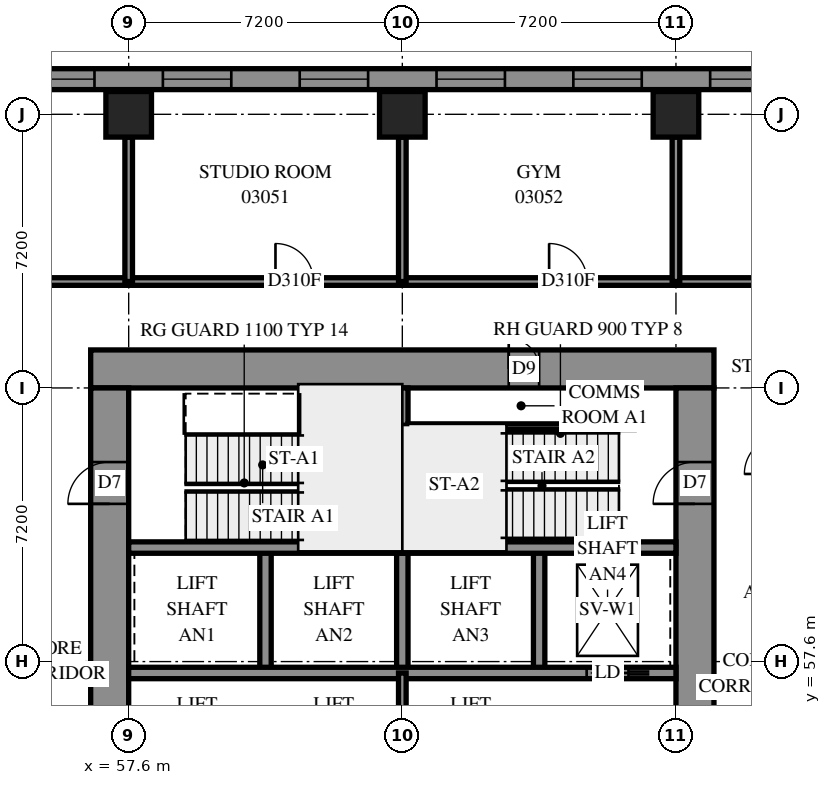
"""IFC4 building model, lengths in metres.
Left out: names, types, materials, properties, quantities, classifications, styles, units other than length and angle.
Written with IfcOpenShell. Run it as: python <this file> out.ifc"""

import sys

from ifc_helpers import new_model, si_unit, direction, frame, frame_2d, origin, origin_2d, place, context, subcontext, project, spatial, polyline, rectangle, outline, extrude, element, fill, save


model = new_model("IFC4")
c1 = context("Model", 3, precision=1e-05, world=origin(), true_north=direction((0.0, 1.0)))
c2 = subcontext(c1, "Body", "Model", "MODEL_VIEW")
j1 = project(units=[si_unit("LENGTHUNIT", "METRE"), si_unit("PLANEANGLEUNIT", "RADIAN")], contexts=[c1])
p1 = place(None, origin())
s1 = spatial("IfcSite", under=j1, at=p1, CompositionType="ELEMENT")
p2 = place(p1, origin())
s2 = spatial("IfcBuilding", under=s1, at=p2, CompositionType="ELEMENT")
p3 = place(p2, frame((0.0, 0.0, 14.4)))
s3 = spatial("IfcBuildingStorey", under=s2, at=p3, CompositionType="ELEMENT", Elevation=14.4)
for number, where, z_axis, x_axis in (
    (1, (57.6, 72.0, 0.0), (0.0, 0.0, 1.0), (1.0, 0.0, 0.0)),
    (2, (64.8, 72.0, 0.0), (0.0, 0.0, 1.0), (1.0, 0.0, 0.0)),
    (3, (72.0, 72.0, 0.0), (0.0, 0.0, 1.0), (1.0, 0.0, 0.0)),
):
    element("IfcColumn", number, at=place(p3, frame(where, z_axis=z_axis, x_axis=x_axis)), inside=s3, PredefinedType="COLUMN", context=c2, shape_type="SweptSolid", body=[
        extrude(rectangle(XDim=1.2, YDim=1.2, at=origin_2d()), origin(), (0.0, 0.0, 1.0), 3.8),
    ])
p4 = place(p3, frame((56.6, 65.3, -0.4), z_axis=(0.0, 0.0, 1.0), x_axis=(1.0, 0.0, 0.0)))
e4 = element("IfcWall", 4, at=p4, inside=s3, PredefinedType="SHEAR", context=c2, shape_type="SweptSolid", body=[
    extrude(rectangle(XDim=16.4, YDim=1.0, at=frame_2d((8.2, 0.0))), origin(), (0.0, 0.0, 1.0), 3.5),
])
p5 = place(p4, frame((11.0, 0.0, 0.4)))
e5 = element("IfcOpeningElement", 5, at=p5, cuts=e4, PredefinedType="OPENING", context=c2, shape_type="SweptSolid", body=[
    extrude(rectangle(XDim=0.8, YDim=2.1, at=frame_2d((0.4, 1.05))), frame((0.0, 0.51, 0.0), z_axis=(0.0, -1.0, 0.0), x_axis=(1.0, 0.0, 0.0)), (0.0, 0.0, 1.0), 1.02),
])
p6 = place(p3, frame((57.1, 50.4, -0.4), z_axis=(0.0, 0.0, 1.0), x_axis=(0.0, 1.0, 0.0)))
e6 = element("IfcWall", 6, at=p6, inside=s3, PredefinedType="SHEAR", context=c2, shape_type="SweptSolid", body=[
    extrude(rectangle(XDim=14.4, YDim=1.0, at=frame_2d((7.2, 0.0))), origin(), (0.0, 0.0, 1.0), 3.5),
])
p7 = place(p6, frame((4.55, 0.0, 0.4)))
e7 = element("IfcOpeningElement", 7, at=p7, cuts=e6, PredefinedType="OPENING", context=c2, shape_type="SweptSolid", body=[
    extrude(rectangle(XDim=1.1, YDim=2.1, at=frame_2d((0.55, 1.05))), frame((0.0, 0.51, 0.0), z_axis=(0.0, -1.0, 0.0), x_axis=(1.0, 0.0, 0.0)), (0.0, 0.0, 1.0), 1.02),
])
p8 = place(p6, frame((11.35, 0.0, 0.4)))
e8 = element("IfcOpeningElement", 8, at=p8, cuts=e6, PredefinedType="OPENING", context=c2, shape_type="SweptSolid", body=[
    extrude(rectangle(XDim=1.1, YDim=2.1, at=frame_2d((0.55, 1.05))), frame((0.0, 0.51, 0.0), z_axis=(0.0, -1.0, 0.0), x_axis=(1.0, 0.0, 0.0)), (0.0, 0.0, 1.0), 1.02),
])
p9 = place(p3, frame((72.5, 50.4, -0.4), z_axis=(0.0, 0.0, 1.0), x_axis=(0.0, 1.0, 0.0)))
e9 = element("IfcWall", 9, at=p9, inside=s3, PredefinedType="SHEAR", context=c2, shape_type="SweptSolid", body=[
    extrude(rectangle(XDim=14.4, YDim=1.0, at=frame_2d((7.2, 0.0))), origin(), (0.0, 0.0, 1.0), 3.5),
])
p10 = place(p9, frame((4.55, 0.0, 0.4)))
e10 = element("IfcOpeningElement", 10, at=p10, cuts=e9, PredefinedType="OPENING", context=c2, shape_type="SweptSolid", body=[
    extrude(rectangle(XDim=1.1, YDim=2.1, at=frame_2d((0.55, 1.05))), frame((0.0, 0.51, 0.0), z_axis=(0.0, -1.0, 0.0), x_axis=(1.0, 0.0, 0.0)), (0.0, 0.0, 1.0), 1.02),
])
p11 = place(p9, frame((11.35, 0.0, 0.4)))
e11 = element("IfcOpeningElement", 11, at=p11, cuts=e9, PredefinedType="OPENING", context=c2, shape_type="SweptSolid", body=[
    extrude(rectangle(XDim=1.1, YDim=2.1, at=frame_2d((0.55, 1.05))), frame((0.0, 0.51, 0.0), z_axis=(0.0, -1.0, 0.0), x_axis=(1.0, 0.0, 0.0)), (0.0, 0.0, 1.0), 1.02),
])
for number, where, z_axis, x_axis in (
    (12, (61.2, 57.3, 0.0), (0.0, 0.0, 1.0), (0.0, 1.0, 0.0)),
    (13, (64.8, 57.3, 0.0), (0.0, 0.0, 1.0), (0.0, 1.0, 0.0)),
    (14, (68.4, 57.3, 0.0), (0.0, 0.0, 1.0), (0.0, 1.0, 0.0)),
):
    element("IfcWall", number, at=place(p3, frame(where, z_axis=z_axis, x_axis=x_axis)), inside=s3, PredefinedType="SOLIDWALL", context=c2, shape_type="SweptSolid", body=[
        extrude(rectangle(XDim=3.3, YDim=0.3, at=frame_2d((1.65, 0.0))), origin(), (0.0, 0.0, 1.0), 3.8),
    ])
p12 = place(p3, frame((57.6, 57.3, 0.0), z_axis=(0.0, 0.0, 1.0), x_axis=(1.0, 0.0, 0.0)))
e15 = element("IfcWall", 15, at=p12, inside=s3, PredefinedType="SOLIDWALL", context=c2, shape_type="SweptSolid", body=[
    extrude(rectangle(XDim=14.4, YDim=0.3, at=frame_2d((7.2, 0.0))), origin(), (0.0, 0.0, 1.0), 3.8),
])
p13 = place(p12, frame((12.05, 0.0, 0.0)))
e16 = element("IfcOpeningElement", 16, at=p13, cuts=e15, PredefinedType="OPENING", context=c2, shape_type="SweptSolid", body=[
    extrude(rectangle(XDim=1.1, YDim=2.1, at=frame_2d((0.55, 1.05))), frame((0.0, 0.16, 0.0), z_axis=(0.0, -1.0, 0.0), x_axis=(1.0, 0.0, 0.0)), (0.0, 0.0, 1.0), 0.32),
])
for number, where, z_axis, x_axis in (
    (17, (57.6, 60.6, 0.0), (0.0, 0.0, 1.0), (1.0, 0.0, 0.0)),
    (18, (64.8, 60.6, 0.0), (0.0, 0.0, 1.0), (1.0, 0.0, 0.0)),
):
    element("IfcWall", number, at=place(p3, frame(where, z_axis=z_axis, x_axis=x_axis)), inside=s3, PredefinedType="SOLIDWALL", context=c2, shape_type="SweptSolid", body=[
        extrude(rectangle(XDim=7.2, YDim=0.3, at=frame_2d((3.6, 0.0))), origin(), (0.0, 0.0, 1.0), 3.8),
    ])
p14 = place(p3, frame((64.8, 60.6, 0.0), z_axis=(0.0, 0.0, 1.0), x_axis=(0.0, 1.0, 0.0)))
e19 = element("IfcWall", 19, at=p14, inside=s3, PredefinedType="SOLIDWALL", context=c2, shape_type="SweptSolid", body=[
    extrude(rectangle(XDim=4.2, YDim=0.3, at=frame_2d((2.1, 0.0))), origin(), (0.0, 0.0, 1.0), 3.8),
])
p15 = place(p3, frame((79.583, 72.925, 0.0), z_axis=(0.0, 0.0, 1.0), x_axis=(-1.0, 0.0, 0.0)))
e20 = element("IfcWall", 20, at=p15, inside=s3, PredefinedType="SOLIDWALL", context=c2, shape_type="SweptSolid", body=[
    extrude(outline(polyline([(-0.114, -0.275), (79.583, -0.275), (79.033, 0.275), (0.114, 0.275), (-0.114, -0.275)])), origin(), (0.0, 0.0, 1.0), 3.8),
])
p16 = place(p15, frame((1.249, 0.0, 0.7)))
e21 = element("IfcOpeningElement", 21, at=p16, cuts=e20, PredefinedType="OPENING", context=c2, shape_type="SweptSolid", body=[
    extrude(rectangle(XDim=1.8, YDim=2.6, at=frame_2d((0.9, 1.3))), frame((0.0, 0.285, 0.0), z_axis=(0.0, -1.0, 0.0), x_axis=(1.0, 0.0, 0.0)), (0.0, 0.0, 1.0), 0.57),
])
p17 = place(p15, frame((4.883, 0.0, 0.7)))
e22 = element("IfcOpeningElement", 22, at=p17, cuts=e20, PredefinedType="OPENING", context=c2, shape_type="SweptSolid", body=[
    extrude(rectangle(XDim=1.8, YDim=2.6, at=frame_2d((0.9, 1.3))), frame((0.0, 0.285, 0.0), z_axis=(0.0, -1.0, 0.0), x_axis=(1.0, 0.0, 0.0)), (0.0, 0.0, 1.0), 0.57),
])
p18 = place(p15, frame((8.483, 0.0, 0.7)))
e23 = element("IfcOpeningElement", 23, at=p18, cuts=e20, PredefinedType="OPENING", context=c2, shape_type="SweptSolid", body=[
    extrude(rectangle(XDim=1.8, YDim=2.6, at=frame_2d((0.9, 1.3))), frame((0.0, 0.285, 0.0), z_axis=(0.0, -1.0, 0.0), x_axis=(1.0, 0.0, 0.0)), (0.0, 0.0, 1.0), 0.57),
])
p19 = place(p15, frame((12.083, 0.0, 0.7)))
e24 = element("IfcOpeningElement", 24, at=p19, cuts=e20, PredefinedType="OPENING", context=c2, shape_type="SweptSolid", body=[
    extrude(rectangle(XDim=1.8, YDim=2.6, at=frame_2d((0.9, 1.3))), frame((0.0, 0.285, 0.0), z_axis=(0.0, -1.0, 0.0), x_axis=(1.0, 0.0, 0.0)), (0.0, 0.0, 1.0), 0.57),
])
p20 = place(p15, frame((15.683, 0.0, 0.7)))
e25 = element("IfcOpeningElement", 25, at=p20, cuts=e20, PredefinedType="OPENING", context=c2, shape_type="SweptSolid", body=[
    extrude(rectangle(XDim=1.8, YDim=2.6, at=frame_2d((0.9, 1.3))), frame((0.0, 0.285, 0.0), z_axis=(0.0, -1.0, 0.0), x_axis=(1.0, 0.0, 0.0)), (0.0, 0.0, 1.0), 0.57),
])
p21 = place(p15, frame((19.283, 0.0, 0.7)))
e26 = element("IfcOpeningElement", 26, at=p21, cuts=e20, PredefinedType="OPENING", context=c2, shape_type="SweptSolid", body=[
    extrude(rectangle(XDim=1.8, YDim=2.6, at=frame_2d((0.9, 1.3))), frame((0.0, 0.285, 0.0), z_axis=(0.0, -1.0, 0.0), x_axis=(1.0, 0.0, 0.0)), (0.0, 0.0, 1.0), 0.57),
])
p22 = place(p15, frame((22.883, 0.0, 0.7)))
e27 = element("IfcOpeningElement", 27, at=p22, cuts=e20, PredefinedType="OPENING", context=c2, shape_type="SweptSolid", body=[
    extrude(rectangle(XDim=1.8, YDim=2.6, at=frame_2d((0.9, 1.3))), frame((0.0, 0.285, 0.0), z_axis=(0.0, -1.0, 0.0), x_axis=(1.0, 0.0, 0.0)), (0.0, 0.0, 1.0), 0.57),
])
p23 = place(p15, frame((26.483, 0.0, 0.7)))
e28 = element("IfcOpeningElement", 28, at=p23, cuts=e20, PredefinedType="OPENING", context=c2, shape_type="SweptSolid", body=[
    extrude(rectangle(XDim=1.8, YDim=2.6, at=frame_2d((0.9, 1.3))), frame((0.0, 0.285, 0.0), z_axis=(0.0, -1.0, 0.0), x_axis=(1.0, 0.0, 0.0)), (0.0, 0.0, 1.0), 0.57),
])
p24 = place(p15, frame((30.083, 0.0, 0.7)))
e29 = element("IfcOpeningElement", 29, at=p24, cuts=e20, PredefinedType="OPENING", context=c2, shape_type="SweptSolid", body=[
    extrude(rectangle(XDim=1.8, YDim=2.6, at=frame_2d((0.9, 1.3))), frame((0.0, 0.285, 0.0), z_axis=(0.0, -1.0, 0.0), x_axis=(1.0, 0.0, 0.0)), (0.0, 0.0, 1.0), 0.57),
])
p25 = place(p15, frame((33.683, 0.0, 0.7)))
e30 = element("IfcOpeningElement", 30, at=p25, cuts=e20, PredefinedType="OPENING", context=c2, shape_type="SweptSolid", body=[
    extrude(rectangle(XDim=1.8, YDim=2.6, at=frame_2d((0.9, 1.3))), frame((0.0, 0.285, 0.0), z_axis=(0.0, -1.0, 0.0), x_axis=(1.0, 0.0, 0.0)), (0.0, 0.0, 1.0), 0.57),
])
p26 = place(p15, frame((37.283, 0.0, 0.7)))
e31 = element("IfcOpeningElement", 31, at=p26, cuts=e20, PredefinedType="OPENING", context=c2, shape_type="SweptSolid", body=[
    extrude(rectangle(XDim=1.8, YDim=2.6, at=frame_2d((0.9, 1.3))), frame((0.0, 0.285, 0.0), z_axis=(0.0, -1.0, 0.0), x_axis=(1.0, 0.0, 0.0)), (0.0, 0.0, 1.0), 0.57),
])
p27 = place(p15, frame((40.883, 0.0, 0.7)))
e32 = element("IfcOpeningElement", 32, at=p27, cuts=e20, PredefinedType="OPENING", context=c2, shape_type="SweptSolid", body=[
    extrude(rectangle(XDim=1.8, YDim=2.6, at=frame_2d((0.9, 1.3))), frame((0.0, 0.285, 0.0), z_axis=(0.0, -1.0, 0.0), x_axis=(1.0, 0.0, 0.0)), (0.0, 0.0, 1.0), 0.57),
])
p28 = place(p15, frame((44.483, 0.0, 0.7)))
e33 = element("IfcOpeningElement", 33, at=p28, cuts=e20, PredefinedType="OPENING", context=c2, shape_type="SweptSolid", body=[
    extrude(rectangle(XDim=1.8, YDim=2.6, at=frame_2d((0.9, 1.3))), frame((0.0, 0.285, 0.0), z_axis=(0.0, -1.0, 0.0), x_axis=(1.0, 0.0, 0.0)), (0.0, 0.0, 1.0), 0.57),
])
p29 = place(p15, frame((48.083, 0.0, 0.7)))
e34 = element("IfcOpeningElement", 34, at=p29, cuts=e20, PredefinedType="OPENING", context=c2, shape_type="SweptSolid", body=[
    extrude(rectangle(XDim=1.8, YDim=2.6, at=frame_2d((0.9, 1.3))), frame((0.0, 0.285, 0.0), z_axis=(0.0, -1.0, 0.0), x_axis=(1.0, 0.0, 0.0)), (0.0, 0.0, 1.0), 0.57),
])
p30 = place(p15, frame((51.683, 0.0, 0.7)))
e35 = element("IfcOpeningElement", 35, at=p30, cuts=e20, PredefinedType="OPENING", context=c2, shape_type="SweptSolid", body=[
    extrude(rectangle(XDim=1.8, YDim=2.6, at=frame_2d((0.9, 1.3))), frame((0.0, 0.285, 0.0), z_axis=(0.0, -1.0, 0.0), x_axis=(1.0, 0.0, 0.0)), (0.0, 0.0, 1.0), 0.57),
])
p31 = place(p15, frame((55.283, 0.0, 0.7)))
e36 = element("IfcOpeningElement", 36, at=p31, cuts=e20, PredefinedType="OPENING", context=c2, shape_type="SweptSolid", body=[
    extrude(rectangle(XDim=1.8, YDim=2.6, at=frame_2d((0.9, 1.3))), frame((0.0, 0.285, 0.0), z_axis=(0.0, -1.0, 0.0), x_axis=(1.0, 0.0, 0.0)), (0.0, 0.0, 1.0), 0.57),
])
p32 = place(p15, frame((58.883, 0.0, 0.7)))
e37 = element("IfcOpeningElement", 37, at=p32, cuts=e20, PredefinedType="OPENING", context=c2, shape_type="SweptSolid", body=[
    extrude(rectangle(XDim=1.8, YDim=2.6, at=frame_2d((0.9, 1.3))), frame((0.0, 0.285, 0.0), z_axis=(0.0, -1.0, 0.0), x_axis=(1.0, 0.0, 0.0)), (0.0, 0.0, 1.0), 0.57),
])
p33 = place(p15, frame((62.483, 0.0, 0.7)))
e38 = element("IfcOpeningElement", 38, at=p33, cuts=e20, PredefinedType="OPENING", context=c2, shape_type="SweptSolid", body=[
    extrude(rectangle(XDim=1.8, YDim=2.6, at=frame_2d((0.9, 1.3))), frame((0.0, 0.285, 0.0), z_axis=(0.0, -1.0, 0.0), x_axis=(1.0, 0.0, 0.0)), (0.0, 0.0, 1.0), 0.57),
])
p34 = place(p15, frame((66.083, 0.0, 0.7)))
e39 = element("IfcOpeningElement", 39, at=p34, cuts=e20, PredefinedType="OPENING", context=c2, shape_type="SweptSolid", body=[
    extrude(rectangle(XDim=1.8, YDim=2.6, at=frame_2d((0.9, 1.3))), frame((0.0, 0.285, 0.0), z_axis=(0.0, -1.0, 0.0), x_axis=(1.0, 0.0, 0.0)), (0.0, 0.0, 1.0), 0.57),
])
p35 = place(p15, frame((69.683, 0.0, 0.7)))
e40 = element("IfcOpeningElement", 40, at=p35, cuts=e20, PredefinedType="OPENING", context=c2, shape_type="SweptSolid", body=[
    extrude(rectangle(XDim=1.8, YDim=2.6, at=frame_2d((0.9, 1.3))), frame((0.0, 0.285, 0.0), z_axis=(0.0, -1.0, 0.0), x_axis=(1.0, 0.0, 0.0)), (0.0, 0.0, 1.0), 0.57),
])
p36 = place(p15, frame((73.683, 0.0, 0.7)))
e41 = element("IfcOpeningElement", 41, at=p36, cuts=e20, PredefinedType="OPENING", context=c2, shape_type="SweptSolid", body=[
    extrude(rectangle(XDim=1.8, YDim=2.6, at=frame_2d((0.9, 1.3))), frame((0.0, 0.285, 0.0), z_axis=(0.0, -1.0, 0.0), x_axis=(1.0, 0.0, 0.0)), (0.0, 0.0, 1.0), 0.57),
])
p37 = place(p15, frame((76.508, 0.0, 0.7)))
e42 = element("IfcOpeningElement", 42, at=p37, cuts=e20, PredefinedType="OPENING", context=c2, shape_type="SweptSolid", body=[
    extrude(rectangle(XDim=1.8, YDim=2.6, at=frame_2d((0.9, 1.3))), frame((0.0, 0.285, 0.0), z_axis=(0.0, -1.0, 0.0), x_axis=(1.0, 0.0, 0.0)), (0.0, 0.0, 1.0), 0.57),
])
p38 = place(p3, frame((64.95, 63.78, 0.0), z_axis=(0.0, 0.0, 1.0), x_axis=(1.0, 0.0, 0.0)))
e43 = element("IfcWall", 43, at=p38, inside=s3, PredefinedType="PARTITIONING", context=c2, shape_type="SweptSolid", body=[
    extrude(rectangle(XDim=5.95, YDim=0.15, at=frame_2d((2.975, 0.0))), origin(), (0.0, 0.0, 1.0), 3.8),
])
p39 = place(p3, frame((70.9, 63.78, 0.0), z_axis=(0.0, 0.0, 1.0), x_axis=(0.0, 1.0, 0.0)))
e44 = element("IfcWall", 44, at=p39, inside=s3, PredefinedType="PARTITIONING", context=c2, shape_type="SweptSolid", body=[
    extrude(rectangle(XDim=1.02, YDim=0.15, at=frame_2d((0.51, 0.0))), origin(), (0.0, 0.0, 1.0), 3.8),
])
p40 = place(p3, frame((64.8, 53.7, 0.0), z_axis=(0.0, 0.0, 1.0), x_axis=(0.0, 1.0, 0.0)))
e45 = element("IfcWall", 45, at=p40, inside=s3, PredefinedType="PARTITIONING", context=c2, shape_type="SweptSolid", body=[
    extrude(rectangle(XDim=3.6, YDim=0.2, at=frame_2d((1.8, 0.0))), origin(), (0.0, 0.0, 1.0), 3.8),
])
p41 = place(p3, frame((54.8, 67.6, 0.0), z_axis=(0.0, 0.0, 1.0), x_axis=(1.0, 0.0, 0.0)))
e46 = element("IfcWall", 46, at=p41, inside=s3, PredefinedType="PARTITIONING", context=c2, shape_type="SweptSolid", body=[
    extrude(rectangle(XDim=20.0, YDim=0.2, at=frame_2d((10.0, 0.0))), origin(), (0.0, 0.0, 1.0), 3.8),
])
p42 = place(p41, frame((6.662, 0.0, 0.0)))
e47 = element("IfcOpeningElement", 47, at=p42, cuts=e46, PredefinedType="OPENING", context=c2, shape_type="SweptSolid", body=[
    extrude(rectangle(XDim=1.0, YDim=2.1, at=frame_2d((0.5, 1.05))), frame((0.0, 0.11, 0.0), z_axis=(0.0, -1.0, 0.0), x_axis=(1.0, 0.0, 0.0)), (0.0, 0.0, 1.0), 0.22),
])
p43 = place(p41, frame((13.863, 0.0, 0.0)))
e48 = element("IfcOpeningElement", 48, at=p43, cuts=e46, PredefinedType="OPENING", context=c2, shape_type="SweptSolid", body=[
    extrude(rectangle(XDim=1.0, YDim=2.1, at=frame_2d((0.5, 1.05))), frame((0.0, 0.11, 0.0), z_axis=(0.0, -1.0, 0.0), x_axis=(1.0, 0.0, 0.0)), (0.0, 0.0, 1.0), 0.22),
])
for number, where, z_axis, x_axis in (
    (49, (57.6, 67.6, 0.0), (0.0, 0.0, 1.0), (0.0, 1.0, 0.0)),
    (50, (64.8, 67.6, 0.0), (0.0, 0.0, 1.0), (0.0, 1.0, 0.0)),
    (51, (72.0, 67.6, 0.0), (0.0, 0.0, 1.0), (0.0, 1.0, 0.0)),
):
    element("IfcWall", number, at=place(p3, frame(where, z_axis=z_axis, x_axis=x_axis)), inside=s3, PredefinedType="PARTITIONING", context=c2, shape_type="SweptSolid", body=[
        extrude(rectangle(XDim=3.8, YDim=0.2, at=frame_2d((1.9, 0.0))), origin(), (0.0, 0.0, 1.0), 3.8),
    ])
p44 = place(p17, origin())
e52 = element("IfcWindow", 52, at=p44, inside=s3, PartitioningType="SINGLE_PANEL", PredefinedType="WINDOW", context=c2, shape_type="SweptSolid", body=[
    extrude(rectangle(XDim=1.8, YDim=2.6, at=frame_2d((0.9, 1.3))), frame((0.0, 0.155, 0.0), z_axis=(0.0, -1.0, 0.0), x_axis=(1.0, 0.0, 0.0)), (0.0, 0.0, 1.0), 0.06),
])
fill(e22, e52)
p45 = place(p18, origin())
e53 = element("IfcWindow", 53, at=p45, inside=s3, PartitioningType="SINGLE_PANEL", PredefinedType="WINDOW", context=c2, shape_type="SweptSolid", body=[
    extrude(rectangle(XDim=1.8, YDim=2.6, at=frame_2d((0.9, 1.3))), frame((0.0, 0.155, 0.0), z_axis=(0.0, -1.0, 0.0), x_axis=(1.0, 0.0, 0.0)), (0.0, 0.0, 1.0), 0.06),
])
fill(e23, e53)
p46 = place(p19, origin())
e54 = element("IfcWindow", 54, at=p46, inside=s3, PartitioningType="SINGLE_PANEL", PredefinedType="WINDOW", context=c2, shape_type="SweptSolid", body=[
    extrude(rectangle(XDim=1.8, YDim=2.6, at=frame_2d((0.9, 1.3))), frame((0.0, 0.155, 0.0), z_axis=(0.0, -1.0, 0.0), x_axis=(1.0, 0.0, 0.0)), (0.0, 0.0, 1.0), 0.06),
])
fill(e24, e54)
p47 = place(p20, origin())
e55 = element("IfcWindow", 55, at=p47, inside=s3, PartitioningType="SINGLE_PANEL", PredefinedType="WINDOW", context=c2, shape_type="SweptSolid", body=[
    extrude(rectangle(XDim=1.8, YDim=2.6, at=frame_2d((0.9, 1.3))), frame((0.0, 0.155, 0.0), z_axis=(0.0, -1.0, 0.0), x_axis=(1.0, 0.0, 0.0)), (0.0, 0.0, 1.0), 0.06),
])
fill(e25, e55)
p48 = place(p21, origin())
e56 = element("IfcWindow", 56, at=p48, inside=s3, PartitioningType="SINGLE_PANEL", PredefinedType="WINDOW", context=c2, shape_type="SweptSolid", body=[
    extrude(rectangle(XDim=1.8, YDim=2.6, at=frame_2d((0.9, 1.3))), frame((0.0, 0.155, 0.0), z_axis=(0.0, -1.0, 0.0), x_axis=(1.0, 0.0, 0.0)), (0.0, 0.0, 1.0), 0.06),
])
fill(e26, e56)
p49 = place(p22, origin())
e57 = element("IfcWindow", 57, at=p49, inside=s3, PartitioningType="SINGLE_PANEL", PredefinedType="WINDOW", context=c2, shape_type="SweptSolid", body=[
    extrude(rectangle(XDim=1.8, YDim=2.6, at=frame_2d((0.9, 1.3))), frame((0.0, 0.155, 0.0), z_axis=(0.0, -1.0, 0.0), x_axis=(1.0, 0.0, 0.0)), (0.0, 0.0, 1.0), 0.06),
])
fill(e27, e57)
p50 = place(p5, origin())
e58 = element("IfcDoor", 58, at=p50, inside=s3, OperationType="SINGLE_SWING_RIGHT", PredefinedType="DOOR", context=c2, shape_type="SweptSolid", body=[
    extrude(rectangle(XDim=0.8, YDim=2.1, at=frame_2d((0.4, 1.05))), frame((0.0, -0.44, 0.0), z_axis=(0.0, -1.0, 0.0), x_axis=(1.0, 0.0, 0.0)), (0.0, 0.0, 1.0), 0.05),
])
fill(e5, e58)
p51 = place(p8, origin())
e59 = element("IfcDoor", 59, at=p51, inside=s3, OperationType="SINGLE_SWING_LEFT", PredefinedType="DOOR", context=c2, shape_type="SweptSolid", body=[
    extrude(rectangle(XDim=1.1, YDim=2.1, at=frame_2d((0.55, 1.05))), frame((0.0, 0.025, 0.0), z_axis=(0.0, -1.0, 0.0), x_axis=(1.0, 0.0, 0.0)), (0.0, 0.0, 1.0), 0.05),
])
fill(e8, e59)
p52 = place(p11, origin())
e60 = element("IfcDoor", 60, at=p52, inside=s3, OperationType="SINGLE_SWING_RIGHT", PredefinedType="DOOR", context=c2, shape_type="SweptSolid", body=[
    extrude(rectangle(XDim=1.1, YDim=2.1, at=frame_2d((0.55, 1.05))), frame((0.0, 0.025, 0.0), z_axis=(0.0, -1.0, 0.0), x_axis=(1.0, 0.0, 0.0)), (0.0, 0.0, 1.0), 0.05),
])
fill(e11, e60)
p53 = place(p13, origin())
e61 = element("IfcDoor", 61, at=p53, inside=s3, OperationType="SLIDING_TO_RIGHT", PredefinedType="DOOR", context=c2, shape_type="SweptSolid", body=[
    extrude(rectangle(XDim=1.1, YDim=2.1, at=frame_2d((0.55, 1.05))), frame((0.0, 0.025, 0.0), z_axis=(0.0, -1.0, 0.0), x_axis=(1.0, 0.0, 0.0)), (0.0, 0.0, 1.0), 0.05),
])
fill(e16, e61)
p54 = place(p42, origin())
e62 = element("IfcDoor", 62, at=p54, inside=s3, OperationType="SINGLE_SWING_RIGHT", PredefinedType="DOOR", context=c2, shape_type="SweptSolid", body=[
    extrude(rectangle(XDim=1.0, YDim=2.1, at=frame_2d((0.5, 1.05))), frame((0.0, 0.025, 0.0), z_axis=(0.0, -1.0, 0.0), x_axis=(1.0, 0.0, 0.0)), (0.0, 0.0, 1.0), 0.05),
])
fill(e47, e62)
p55 = place(p43, origin())
e63 = element("IfcDoor", 63, at=p55, inside=s3, OperationType="SINGLE_SWING_RIGHT", PredefinedType="DOOR", context=c2, shape_type="SweptSolid", body=[
    extrude(rectangle(XDim=1.0, YDim=2.1, at=frame_2d((0.5, 1.05))), frame((0.0, 0.025, 0.0), z_axis=(0.0, -1.0, 0.0), x_axis=(1.0, 0.0, 0.0)), (0.0, 0.0, 1.0), 0.05),
])
fill(e48, e63)
save(model, sys.argv[1])
